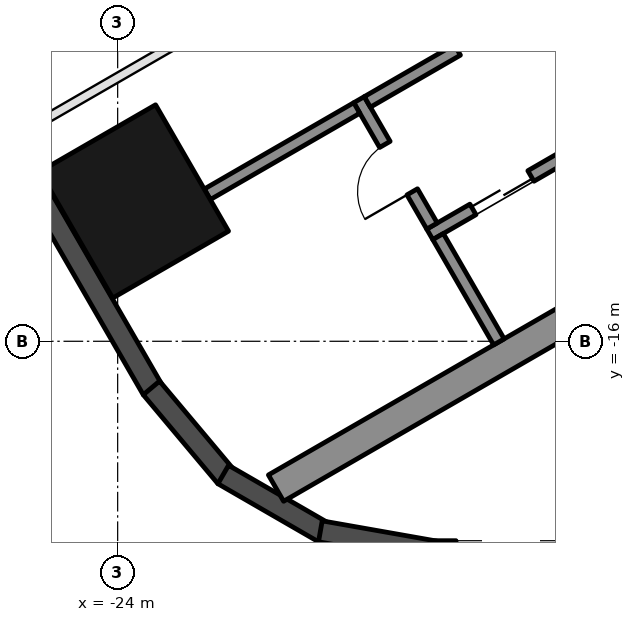
"""IFC4 building model, lengths in metres.
Left out: names, types, materials, properties, quantities, classifications, styles, units other than length and angle.
Written with IfcOpenShell. Run it as: python <this file> out.ifc"""

import sys

from ifc_helpers import new_model, si_unit, direction, frame, frame_2d, origin, origin_2d, place, context, subcontext, project, spatial, rectangle, hollow_rectangle, extrude, element, fill, save


model = new_model("IFC4")
c1 = context("Model", 3, precision=1e-05, world=origin(), true_north=direction((0.0, 1.0)))
c2 = subcontext(c1, "Body", "Model", "MODEL_VIEW")
j1 = project(units=[si_unit("LENGTHUNIT", "METRE"), si_unit("PLANEANGLEUNIT", "RADIAN")], contexts=[c1])
p1 = place(None, origin())
s1 = spatial("IfcSite", under=j1, at=p1, CompositionType="ELEMENT")
p2 = place(p1, origin())
s2 = spatial("IfcBuilding", under=s1, at=p2, CompositionType="ELEMENT")
p3 = place(p2, frame((0.0, 0.0, 150.3)))
s3 = spatial("IfcBuildingStorey", under=s2, at=p3, CompositionType="ELEMENT", Elevation=150.3)
p4 = place(p3, frame((-23.729, -13.7, 0.0), z_axis=(0.0, 0.0, 1.0), x_axis=(-0.5, 0.866025403784, 0.0)))
e1 = element("IfcColumn", 1, at=p4, inside=s3, PredefinedType="COLUMN", context=c2, shape_type="SweptSolid", body=[
    extrude(hollow_rectangle(XDim=2.4, YDim=2.2, WallThickness=0.06, at=origin_2d()), origin(), (0.0, 0.0, 1.0), 3.7),
])
p5 = place(p3, frame((-26.257, -11.893, 0.0), z_axis=(0.0, 0.0, 1.0), x_axis=(0.500018773155, -0.866014564827, 0.0)))
e2 = element("IfcWall", 2, at=p5, inside=s3, PredefinedType="SOLIDWALL", context=c2, shape_type="SweptSolid", body=[
    extrude(rectangle(XDim=5.658, YDim=0.35, at=frame_2d((2.829, 0.0))), origin(), (0.0, 0.0, 1.0), 3.55),
])
for number, where, z_axis, x_axis in (
    (3, (-23.445, -16.768, 0.0), (0.0, 0.0, 1.0), (0.643, -0.766, 0.0)),
    (4, (-22.264, -18.192, 0.0), (0.0, 0.0, 1.0), (0.866, -0.5, 0.0)),
):
    element("IfcWall", number, at=place(p3, frame(where, z_axis=z_axis, x_axis=x_axis)), inside=s3, PredefinedType="SOLIDWALL", context=c2, shape_type="SweptSolid", body=[
        extrude(rectangle(XDim=1.91, YDim=0.35, at=frame_2d((0.955, 0.0))), origin(), (0.0, 0.0, 1.0), 3.55),
    ])
p6 = place(p3, frame((-20.667, -19.126, 0.0), z_axis=(0.0, 0.0, 1.0), x_axis=(0.984798995425, -0.173697837091, 0.0)))
e5 = element("IfcWall", 5, at=p6, inside=s3, PredefinedType="SOLIDWALL", context=c2, shape_type="SweptSolid", body=[
    extrude(rectangle(XDim=1.91, YDim=0.35, at=frame_2d((0.955, 0.0))), origin(), (0.0, 0.0, 1.0), 3.55),
])
p7 = place(p3, frame((-18.816, -19.455, 0.0), z_axis=(0.0, 0.0, 1.0), x_axis=(1.0, 0.0, 0.0)))
e6 = element("IfcWall", 6, at=p7, inside=s3, PredefinedType="SOLIDWALL", context=c2, shape_type="SweptSolid", body=[
    extrude(rectangle(XDim=11.816, YDim=0.35, at=frame_2d((5.908, 0.0))), origin(), (0.0, 0.0, 1.0), 3.55),
])
p8 = place(p7, frame((0.381, 0.0, 0.3)))
e7 = element("IfcOpeningElement", 7, at=p8, cuts=e6, PredefinedType="OPENING", context=c2, shape_type="SweptSolid", body=[
    extrude(rectangle(XDim=1.8, YDim=2.65, at=frame_2d((0.9, 1.325))), frame((0.0, 0.185, 0.0), z_axis=(0.0, -1.0, 0.0), x_axis=(1.0, 0.0, 0.0)), (0.0, 0.0, 1.0), 0.37),
])
p9 = place(p7, frame((7.74, 0.0, 0.0)))
e8 = element("IfcOpeningElement", 8, at=p9, cuts=e6, PredefinedType="OPENING", context=c2, shape_type="SweptSolid", body=[
    extrude(rectangle(XDim=2.4, YDim=2.4, at=frame_2d((1.2, 1.2))), frame((0.0, 0.185, 0.0), z_axis=(0.0, -1.0, 0.0), x_axis=(1.0, 0.0, 0.0)), (0.0, 0.0, 1.0), 0.37),
])
p10 = place(p7, frame((3.791, 0.0, 0.3)))
e9 = element("IfcOpeningElement", 9, at=p10, cuts=e6, PredefinedType="OPENING", context=c2, shape_type="SweptSolid", body=[
    extrude(rectangle(XDim=1.6, YDim=2.65, at=frame_2d((0.8, 1.325))), frame((0.0, 0.185, 0.0), z_axis=(0.0, -1.0, 0.0), x_axis=(1.0, 0.0, 0.0)), (0.0, 0.0, 1.0), 0.37),
])
p11 = place(p7, frame((5.691, 0.0, 0.3)))
e10 = element("IfcOpeningElement", 10, at=p11, cuts=e6, PredefinedType="OPENING", context=c2, shape_type="SweptSolid", body=[
    extrude(rectangle(XDim=1.6, YDim=2.65, at=frame_2d((0.8, 1.325))), frame((0.0, 0.185, 0.0), z_axis=(0.0, -1.0, 0.0), x_axis=(1.0, 0.0, 0.0)), (0.0, 0.0, 1.0), 0.37),
])
p12 = place(p3, frame((-8.547, -10.997, 0.0), z_axis=(0.0, 0.0, 1.0), x_axis=(-0.866025009528, -0.500000682871, 0.0)))
e11 = element("IfcWall", 11, at=p12, inside=s3, PredefinedType="SHEAR", context=c2, shape_type="SweptSolid", body=[
    extrude(rectangle(XDim=14.837, YDim=0.5, at=frame_2d((7.418, 0.0))), origin(), (0.0, 0.0, 1.0), 3.5),
])
p13 = place(p3, frame((-10.068, -9.162, 0.0), z_axis=(0.0, 0.0, 1.0), x_axis=(-0.866032725843, -0.499987317609, 0.0)))
e12 = element("IfcWall", 12, at=p13, inside=s3, PredefinedType="SHEAR", context=c2, shape_type="SweptSolid", body=[
    extrude(rectangle(XDim=10.16, YDim=0.2, at=frame_2d((5.08, 0.0))), origin(), (0.0, 0.0, 1.0), 3.5),
])
p14 = place(p13, frame((0.62, 0.0, 0.0)))
e13 = element("IfcOpeningElement", 13, at=p14, cuts=e12, PredefinedType="OPENING", context=c2, shape_type="SweptSolid", body=[
    extrude(rectangle(XDim=1.1, YDim=2.1, at=frame_2d((0.55, 1.05))), frame((0.0, 0.11, 0.0), z_axis=(0.0, -1.0, 0.0), x_axis=(1.0, 0.0, 0.0)), (0.0, 0.0, 1.0), 0.22),
])
p15 = place(p13, frame((3.16, 0.0, 0.0)))
e14 = element("IfcOpeningElement", 14, at=p15, cuts=e12, PredefinedType="OPENING", context=c2, shape_type="SweptSolid", body=[
    extrude(rectangle(XDim=1.1, YDim=2.1, at=frame_2d((0.55, 1.05))), frame((0.0, 0.11, 0.0), z_axis=(0.0, -1.0, 0.0), x_axis=(1.0, 0.0, 0.0)), (0.0, 0.0, 1.0), 0.22),
])
p16 = place(p13, frame((5.7, 0.0, 0.0)))
e15 = element("IfcOpeningElement", 15, at=p16, cuts=e12, PredefinedType="OPENING", context=c2, shape_type="SweptSolid", body=[
    extrude(rectangle(XDim=1.1, YDim=2.1, at=frame_2d((0.55, 1.05))), frame((0.0, 0.11, 0.0), z_axis=(0.0, -1.0, 0.0), x_axis=(1.0, 0.0, 0.0)), (0.0, 0.0, 1.0), 0.22),
])
p17 = place(p13, frame((8.24, 0.0, 0.0)))
e16 = element("IfcOpeningElement", 16, at=p17, cuts=e12, PredefinedType="OPENING", context=c2, shape_type="SweptSolid", body=[
    extrude(rectangle(XDim=1.1, YDim=2.1, at=frame_2d((0.55, 1.05))), frame((0.0, 0.11, 0.0), z_axis=(0.0, -1.0, 0.0), x_axis=(1.0, 0.0, 0.0)), (0.0, 0.0, 1.0), 0.22),
])
p18 = place(p3, frame((-20.031, -12.026, 0.0), z_axis=(0.0, 0.0, 1.0), x_axis=(0.500033551112, -0.866006032174, 0.0)))
e17 = element("IfcWall", 17, at=p18, inside=s3, PredefinedType="SHEAR", context=c2, shape_type="SweptSolid", body=[
    extrude(rectangle(XDim=2.4, YDim=0.2, at=frame_2d((1.2, 0.0))), origin(), (0.0, 0.0, 1.0), 3.5),
])
p19 = place(p18, frame((0.85, 0.0, 0.0)))
e18 = element("IfcOpeningElement", 18, at=p19, cuts=e17, PredefinedType="OPENING", context=c2, shape_type="SweptSolid", body=[
    extrude(rectangle(XDim=0.9, YDim=2.1, at=frame_2d((0.45, 1.05))), frame((0.0, 0.11, 0.0), z_axis=(0.0, -1.0, 0.0), x_axis=(1.0, 0.0, 0.0)), (0.0, 0.0, 1.0), 0.22),
])
p20 = place(p3, frame((-18.413, -11.208, 0.0), z_axis=(0.0, 0.0, 1.0), x_axis=(-0.866038183914, -0.499977863513, 0.0)))
e19 = element("IfcWall", 19, at=p20, inside=s3, PredefinedType="SHEAR", context=c2, shape_type="SweptSolid", body=[
    extrude(rectangle(XDim=1.71, YDim=0.2, at=frame_2d((0.855, 0.0))), origin(), (0.0, 0.0, 1.0), 3.5),
])
p21 = place(p3, frame((-18.73, -14.278, 0.0), z_axis=(0.0, 0.0, 1.0), x_axis=(0.50002537861, -0.866010750942, 0.0)))
e20 = element("IfcWall", 20, at=p21, inside=s3, PredefinedType="SHEAR", context=c2, shape_type="SweptSolid", body=[
    extrude(rectangle(XDim=2.0, YDim=0.2, at=frame_2d((1.0, 0.0))), origin(), (0.0, 0.0, 1.0), 3.5),
])
p22 = place(p3, frame((-20.067, -12.163, 0.0), z_axis=(0.0, 0.0, 1.0), x_axis=(-0.866055327414, -0.49994816717, 0.0)))
e21 = element("IfcWall", 21, at=p22, inside=s3, PredefinedType="SHEAR", context=c2, shape_type="SweptSolid", body=[
    extrude(rectangle(XDim=2.84, YDim=0.2, at=frame_2d((1.42, 0.0))), origin(), (0.0, 0.0, 1.0), 3.5),
])
p23 = place(p3, frame((-19.613, -9.13, 0.0), z_axis=(0.0, 0.0, 1.0), x_axis=(-0.866031734426, -0.499989034847, 0.0)))
e22 = element("IfcWall", 22, at=p23, inside=s3, PredefinedType="PARTITIONING", context=c2, shape_type="SweptSolid", body=[
    extrude(rectangle(XDim=6.95, YDim=0.15, at=frame_2d((3.475, 0.0))), origin(), (0.0, 0.0, 1.0), 3.5),
])
p24 = place(p17, origin())
e23 = element("IfcDoor", 23, at=p24, inside=s3, OperationType="DOUBLE_DOOR_SLIDING", PredefinedType="DOOR", context=c2, shape_type="SweptSolid", body=[
    extrude(rectangle(XDim=1.1, YDim=2.1, at=frame_2d((0.55, 1.05))), frame((0.0, 0.025, 0.0), z_axis=(0.0, -1.0, 0.0), x_axis=(1.0, 0.0, 0.0)), (0.0, 0.0, 1.0), 0.05),
])
fill(e16, e23)
p25 = place(p19, frame((0.9, 0.0, 0.0), z_axis=(0.0, 0.0, 1.0), x_axis=(-1.0, 0.0, 0.0)))
e24 = element("IfcDoor", 24, at=p25, inside=s3, OperationType="SINGLE_SWING_LEFT", PredefinedType="DOOR", context=c2, shape_type="SweptSolid", body=[
    extrude(rectangle(XDim=0.9, YDim=2.1, at=frame_2d((0.45, 1.05))), frame((0.0, 0.025, 0.0), z_axis=(0.0, -1.0, 0.0), x_axis=(1.0, 0.0, 0.0)), (0.0, 0.0, 1.0), 0.05),
])
fill(e18, e24)
save(model, sys.argv[1])
